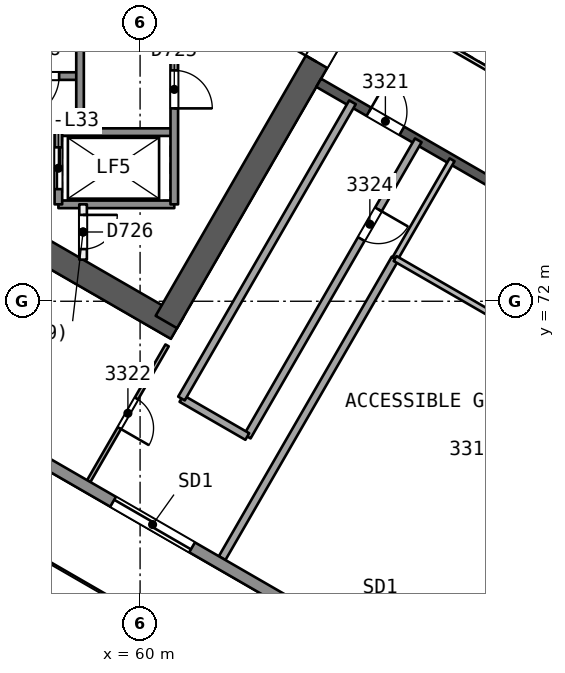
"""IFC4 building model, lengths in metres.
Left out: names, types, materials, properties, quantities, classifications, styles, units other than length and angle.
Written with IfcOpenShell. Run it as: python <this file> out.ifc"""

import sys

from ifc_helpers import new_model, si_unit, direction, frame, frame_2d, origin, place, context, subcontext, project, spatial, rectangle, extrude, element, fill, save


model = new_model("IFC4")
c1 = context("Model", 3, precision=1e-05, world=origin(), true_north=direction((0.0, 1.0)))
c2 = subcontext(c1, "Body", "Model", "MODEL_VIEW")
j1 = project(units=[si_unit("LENGTHUNIT", "METRE"), si_unit("PLANEANGLEUNIT", "RADIAN")], contexts=[c1])
p1 = place(None, origin())
s1 = spatial("IfcSite", under=j1, at=p1, CompositionType="ELEMENT")
p2 = place(p1, origin())
s2 = spatial("IfcBuilding", under=s1, at=p2, CompositionType="ELEMENT")
p3 = place(p2, frame((0.0, 0.0, 136.4)))
s3 = spatial("IfcBuildingStorey", under=s2, at=p3, CompositionType="ELEMENT", Elevation=136.4)
p4 = place(p3, frame((48.722, 78.365, 0.0), z_axis=(0.0, 0.0, 1.0), x_axis=(0.866020036431, -0.500009296414, 0.0)))
e1 = element("IfcWall", 1, at=p4, inside=s3, PredefinedType="SHEAR", context=c2, shape_type="SweptSolid", body=[
    extrude(rectangle(XDim=14.146, YDim=0.65, at=frame_2d((7.073, 0.0))), origin(), (0.0, 0.0, 1.0), 3.7),
])
p5 = place(p3, frame((60.691, 71.455, 0.0), z_axis=(0.0, 0.0, 1.0), x_axis=(0.499983075189, 0.866035175108, 0.0)))
e2 = element("IfcWall", 2, at=p5, inside=s3, PredefinedType="SHEAR", context=c2, shape_type="SweptSolid", body=[
    extrude(rectangle(XDim=10.055, YDim=0.65, at=frame_2d((5.027, 0.0))), origin(), (0.0, 0.0, 1.0), 3.7),
])
p6 = place(p5, frame((7.905, 0.0, 0.0)))
e3 = element("IfcOpeningElement", 3, at=p6, cuts=e2, PredefinedType="OPENING", context=c2, shape_type="SweptSolid", body=[
    extrude(rectangle(XDim=1.2, YDim=2.1, at=frame_2d((0.6, 1.05))), frame((0.0, 0.335, 0.0), z_axis=(0.0, -1.0, 0.0), x_axis=(1.0, 0.0, 0.0)), (0.0, 0.0, 1.0), 0.671),
])
p7 = place(p3, frame((64.7, 77.748, 0.0), z_axis=(0.0, 0.0, 1.0), x_axis=(0.866026492143, -0.499998114903, 0.0)))
e4 = element("IfcWall", 4, at=p7, inside=s3, PredefinedType="SHEAR", context=c2, shape_type="SweptSolid", body=[
    extrude(rectangle(XDim=15.588, YDim=0.25, at=frame_2d((7.794, 0.0))), origin(), (0.0, 0.0, 1.0), 3.25),
])
p8 = place(p7, frame((1.527, 0.0, 0.0)))
e5 = element("IfcOpeningElement", 5, at=p8, cuts=e4, PredefinedType="OPENING", context=c2, shape_type="SweptSolid", body=[
    extrude(rectangle(XDim=1.0, YDim=2.1, at=frame_2d((0.5, 1.05))), frame((0.0, 0.135, 0.0), z_axis=(0.0, -1.0, 0.0), x_axis=(1.0, 0.0, 0.0)), (0.0, 0.0, 1.0), 0.271),
])
p9 = place(p7, frame((8.538, 0.0, 0.0)))
e6 = element("IfcOpeningElement", 6, at=p9, cuts=e4, PredefinedType="OPENING", context=c2, shape_type="SweptSolid", body=[
    extrude(rectangle(XDim=1.1, YDim=2.1, at=frame_2d((0.55, 1.05))), frame((0.0, 0.135, 0.0), z_axis=(0.0, -1.0, 0.0), x_axis=(1.0, 0.0, 0.0)), (0.0, 0.0, 1.0), 0.271),
])
p10 = place(p7, frame((12.906, 0.0, 0.0)))
e7 = element("IfcOpeningElement", 7, at=p10, cuts=e4, PredefinedType="OPENING", context=c2, shape_type="SweptSolid", body=[
    extrude(rectangle(XDim=1.0, YDim=2.1, at=frame_2d((0.5, 1.05))), frame((0.0, 0.135, 0.0), z_axis=(0.0, -1.0, 0.0), x_axis=(1.0, 0.0, 0.0)), (0.0, 0.0, 1.0), 0.271),
])
p11 = place(p3, frame((60.71, 70.838, 0.0), z_axis=(0.0, 0.0, 1.0), x_axis=(-0.499997465321, -0.866026867177, 0.0)))
e8 = element("IfcWall", 8, at=p11, inside=s3, PredefinedType="PARTITIONING", context=c2, shape_type="SweptSolid", body=[
    extrude(rectangle(XDim=4.124, YDim=0.1, at=frame_2d((2.062, 0.0))), origin(), (0.0, 0.0, 1.0), 3.25),
])
p12 = place(p11, frame((1.612, 0.0, 0.0)))
e9 = element("IfcOpeningElement", 9, at=p12, cuts=e8, PredefinedType="OPENING", context=c2, shape_type="SweptSolid", body=[
    extrude(rectangle(XDim=0.9, YDim=2.1, at=frame_2d((0.45, 1.05))), frame((0.0, 0.061, 0.0), z_axis=(0.0, -1.0, 0.0), x_axis=(1.0, 0.0, 0.0)), (0.0, 0.0, 1.0), 0.121),
])
p13 = place(p3, frame((67.321, 76.235, 0.0), z_axis=(0.0, 0.0, 1.0), x_axis=(-0.5000018851, -0.866024315419, 0.0)))
e10 = element("IfcWall", 10, at=p13, inside=s3, PredefinedType="PARTITIONING", context=c2, shape_type="SweptSolid", body=[
    extrude(rectangle(XDim=9.0, YDim=0.2, at=frame_2d((4.5, 0.0))), origin(), (0.0, 0.0, 1.0), 3.25),
])
p14 = place(p13, frame((2.1, 0.0, 0.0)))
e11 = element("IfcOpeningElement", 11, at=p14, cuts=e10, PredefinedType="OPENING", context=c2, shape_type="SweptSolid", body=[
    extrude(rectangle(XDim=0.9, YDim=2.1, at=frame_2d((0.45, 1.05))), frame((0.0, 0.11, 0.0), z_axis=(0.0, -1.0, 0.0), x_axis=(1.0, 0.0, 0.0)), (0.0, 0.0, 1.0), 0.221),
])
p15 = place(p3, frame((62.821, 68.441, 0.0), z_axis=(0.0, 0.0, 1.0), x_axis=(-0.866041268327, 0.499972520799, 0.0)))
e12 = element("IfcWall", 12, at=p15, inside=s3, PredefinedType="PARTITIONING", context=c2, shape_type="SweptSolid", body=[
    extrude(rectangle(XDim=2.0, YDim=0.2, at=frame_2d((1.0, 0.0))), origin(), (0.0, 0.0, 1.0), 3.25),
])
p16 = place(p3, frame((61.089, 69.441, 0.0), z_axis=(0.0, 0.0, 1.0), x_axis=(0.5000018851, 0.866024315419, 0.0)))
e13 = element("IfcWall", 13, at=p16, inside=s3, PredefinedType="PARTITIONING", context=c2, shape_type="SweptSolid", body=[
    extrude(rectangle(XDim=9.0, YDim=0.2, at=frame_2d((4.5, 0.0))), origin(), (0.0, 0.0, 1.0), 3.25),
])
p17 = place(p3, frame((62.158, 65.24, 0.0), z_axis=(0.0, 0.0, 1.0), x_axis=(0.500007237546, 0.866021225145, 0.0)))
e14 = element("IfcWall", 14, at=p17, inside=s3, PredefinedType="PARTITIONING", context=c2, shape_type="SweptSolid", body=[
    extrude(rectangle(XDim=9.103, YDim=0.2, at=frame_2d((4.551, 0.0))), origin(), (0.0, 0.0, 1.0), 3.25),
])
p18 = place(p3, frame((66.71, 73.124, 0.0), z_axis=(0.0, 0.0, 1.0), x_axis=(0.499990139034, 0.866031096941, 0.0)))
e15 = element("IfcWall", 15, at=p18, inside=s3, PredefinedType="PARTITIONING", context=c2, shape_type="SweptSolid", body=[
    extrude(rectangle(XDim=3.0, YDim=0.15, at=frame_2d((1.5, 0.0))), origin(), (0.0, 0.0, 1.0), 3.25),
])
p19 = place(p3, frame((69.221, 71.674, 0.0), z_axis=(0.0, 0.0, 1.0), x_axis=(-0.866032775405, 0.499987231761, 0.0)))
e16 = element("IfcWall", 16, at=p19, inside=s3, PredefinedType="PARTITIONING", context=c2, shape_type="SweptSolid", body=[
    extrude(rectangle(XDim=2.9, YDim=0.15, at=frame_2d((1.45, 0.0))), origin(), (0.0, 0.0, 1.0), 3.25),
])
p20 = place(p3, frame((68.369, 61.655, 0.0), z_axis=(0.0, 0.0, 1.0), x_axis=(0.499987870058, 0.866032406896, 0.0)))
e17 = element("IfcWall", 17, at=p20, inside=s3, PredefinedType="PARTITIONING", context=c2, shape_type="SweptSolid", body=[
    extrude(rectangle(XDim=12.103, YDim=0.2, at=frame_2d((6.051, 0.0))), origin(), (0.0, 0.0, 1.0), 3.25),
])
p21 = place(p3, frame((89.421, 49.328, 0.0), z_axis=(0.0, 0.0, 1.0), x_axis=(-0.866024492862, 0.50000157776, 0.0)))
e18 = element("IfcWall", 18, at=p21, inside=s3, PredefinedType="SOLIDWALL", context=c2, shape_type="SweptSolid", body=[
    extrude(rectangle(XDim=55.649, YDim=0.3, at=frame_2d((27.825, 0.0))), origin(), (0.0, 0.0, 1.0), 3.25),
])
p22 = place(p21, frame((26.781, 0.0, 0.0)))
e19 = element("IfcOpeningElement", 19, at=p22, cuts=e18, PredefinedType="OPENING", context=c2, shape_type="SweptSolid", body=[
    extrude(rectangle(XDim=2.4, YDim=2.4, at=frame_2d((1.2, 1.2))), frame((0.0, 0.161, 0.0), z_axis=(0.0, -1.0, 0.0), x_axis=(1.0, 0.0, 0.0)), (0.0, 0.0, 1.0), 0.321),
])
p23 = place(p21, frame((32.392, 0.0, 0.0)))
e20 = element("IfcOpeningElement", 20, at=p23, cuts=e18, PredefinedType="OPENING", context=c2, shape_type="SweptSolid", body=[
    extrude(rectangle(XDim=2.4, YDim=2.4, at=frame_2d((1.2, 1.2))), frame((0.0, 0.161, 0.0), z_axis=(0.0, -1.0, 0.0), x_axis=(1.0, 0.0, 0.0)), (0.0, 0.0, 1.0), 0.321),
])
p24 = place(p21, frame((43.22, 0.0, 0.0)))
e21 = element("IfcOpeningElement", 21, at=p24, cuts=e18, PredefinedType="OPENING", context=c2, shape_type="SweptSolid", body=[
    extrude(rectangle(XDim=2.4, YDim=2.4, at=frame_2d((1.2, 1.2))), frame((0.0, 0.161, 0.0), z_axis=(0.0, -1.0, 0.0), x_axis=(1.0, 0.0, 0.0)), (0.0, 0.0, 1.0), 0.321),
])
p25 = place(p21, frame((21.013, 0.0, 0.0)))
e22 = element("IfcOpeningElement", 22, at=p25, cuts=e18, PredefinedType="OPENING", context=c2, shape_type="SweptSolid", body=[
    extrude(rectangle(XDim=2.4, YDim=2.4, at=frame_2d((1.2, 1.2))), frame((0.0, 0.161, 0.0), z_axis=(0.0, -1.0, 0.0), x_axis=(1.0, 0.0, 0.0)), (0.0, 0.0, 1.0), 0.321),
])
p26 = place(p21, frame((10.021, 0.0, 0.0)))
e23 = element("IfcOpeningElement", 23, at=p26, cuts=e18, PredefinedType="OPENING", context=c2, shape_type="SweptSolid", body=[
    extrude(rectangle(XDim=2.4, YDim=2.4, at=frame_2d((1.2, 1.2))), frame((0.0, 0.161, 0.0), z_axis=(0.0, -1.0, 0.0), x_axis=(1.0, 0.0, 0.0)), (0.0, 0.0, 1.0), 0.321),
])
p27 = place(p3, frame((58.42, 77.925, 0.0), z_axis=(0.0, 0.0, 1.0), x_axis=(-1.0, 0.0, 0.0)))
e24 = element("IfcWall", 24, at=p27, inside=s3, PredefinedType="SOLIDWALL", context=c2, shape_type="SweptSolid", body=[
    extrude(rectangle(XDim=7.7, YDim=0.2, at=frame_2d((3.85, 0.0))), origin(), (0.0, 0.0, 1.0), 3.25),
])
p28 = place(p27, frame((0.55, 0.0, 0.0)))
e25 = element("IfcOpeningElement", 25, at=p28, cuts=e24, PredefinedType="OPENING", context=c2, shape_type="SweptSolid", body=[
    extrude(rectangle(XDim=1.1, YDim=2.1, at=frame_2d((0.55, 1.05))), frame((0.0, 0.11, 0.0), z_axis=(0.0, -1.0, 0.0), x_axis=(1.0, 0.0, 0.0)), (0.0, 0.0, 1.0), 0.221),
])
for number, where, z_axis, x_axis in (
    (26, (60.9, 76.45, 0.0), (0.0, 0.0, 1.0), (-1.0, 0.0, 0.0)),
    (27, (60.9, 74.55, 0.0), (0.0, 0.0, 1.0), (-1.0, 0.0, 0.0)),
):
    element("IfcWall", number, at=place(p3, frame(where, z_axis=z_axis, x_axis=x_axis)), inside=s3, PredefinedType="SOLIDWALL", context=c2, shape_type="SweptSolid", body=[
        extrude(rectangle(XDim=3.05, YDim=0.2, at=frame_2d((1.525, 0.0))), origin(), (0.0, 0.0, 1.0), 3.25),
    ])
p29 = place(p3, frame((60.9, 85.45, 0.0), z_axis=(0.0, 0.0, 1.0), x_axis=(0.0, -1.0, 0.0)))
e28 = element("IfcWall", 28, at=p29, inside=s3, PredefinedType="SOLIDWALL", context=c2, shape_type="SweptSolid", body=[
    extrude(rectangle(XDim=10.9, YDim=0.2, at=frame_2d((5.45, 0.0))), origin(), (0.0, 0.0, 1.0), 3.25),
])
p30 = place(p29, frame((2.875, 0.0, 0.0)))
e29 = element("IfcOpeningElement", 29, at=p30, cuts=e28, PredefinedType="OPENING", context=c2, shape_type="SweptSolid", body=[
    extrude(rectangle(XDim=1.0, YDim=2.1, at=frame_2d((0.5, 1.05))), frame((0.0, 0.11, 0.0), z_axis=(0.0, -1.0, 0.0), x_axis=(1.0, 0.0, 0.0)), (0.0, 0.0, 1.0), 0.221),
])
p31 = place(p29, frame((7.375, 0.0, 0.0)))
e30 = element("IfcOpeningElement", 30, at=p31, cuts=e28, PredefinedType="OPENING", context=c2, shape_type="SweptSolid", body=[
    extrude(rectangle(XDim=1.0, YDim=2.1, at=frame_2d((0.5, 1.05))), frame((0.0, 0.11, 0.0), z_axis=(0.0, -1.0, 0.0), x_axis=(1.0, 0.0, 0.0)), (0.0, 0.0, 1.0), 0.221),
])
p32 = place(p3, frame((58.5, 74.55, 0.0), z_axis=(0.0, 0.0, 1.0), x_axis=(0.0, -1.0, 0.0)))
e31 = element("IfcWall", 31, at=p32, inside=s3, PredefinedType="PARTITIONING", context=c2, shape_type="SweptSolid", body=[
    extrude(rectangle(XDim=1.455, YDim=0.2, at=frame_2d((0.728, 0.0))), origin(), (0.0, 0.0, 1.0), 3.25),
])
p33 = place(p32, frame((0.278, 0.0, 0.0)))
e32 = element("IfcOpeningElement", 32, at=p33, cuts=e31, PredefinedType="OPENING", context=c2, shape_type="SweptSolid", body=[
    extrude(rectangle(XDim=0.9, YDim=2.1, at=frame_2d((0.45, 1.05))), frame((0.0, 0.11, 0.0), z_axis=(0.0, -1.0, 0.0), x_axis=(1.0, 0.0, 0.0)), (0.0, 0.0, 1.0), 0.221),
])
p34 = place(p3, frame((58.42, 85.45, 0.0), z_axis=(0.0, 0.0, 1.0), x_axis=(0.0, -1.0, 0.0)))
e33 = element("IfcWall", 33, at=p34, inside=s3, PredefinedType="SOLIDWALL", context=c2, shape_type="SweptSolid", body=[
    extrude(rectangle(XDim=9.0, YDim=0.2, at=frame_2d((4.5, 0.0))), origin(), (0.0, 0.0, 1.0), 3.25),
])
p35 = place(p3, frame((57.85, 76.45, 0.0), z_axis=(0.0, 0.0, 1.0), x_axis=(0.0, -1.0, 0.0)))
e34 = element("IfcWall", 34, at=p35, inside=s3, PredefinedType="SOLIDWALL", context=c2, shape_type="SweptSolid", body=[
    extrude(rectangle(XDim=1.9, YDim=0.2, at=frame_2d((0.95, 0.0))), origin(), (0.0, 0.0, 1.0), 3.25),
])
p36 = place(p35, frame((0.4, 0.0, 0.0)))
e35 = element("IfcOpeningElement", 35, at=p36, cuts=e34, PredefinedType="OPENING", context=c2, shape_type="SweptSolid", body=[
    extrude(rectangle(XDim=1.1, YDim=2.1, at=frame_2d((0.55, 1.05))), frame((0.0, 0.11, 0.0), z_axis=(0.0, -1.0, 0.0), x_axis=(1.0, 0.0, 0.0)), (0.0, 0.0, 1.0), 0.221),
])
p37 = place(p3, frame((67.702, 78.948, 0.0), z_axis=(0.0, 0.0, 1.0), x_axis=(0.866026658274, -0.499997827154, 0.0)))
e36 = element("IfcWall", 36, at=p37, inside=s3, PredefinedType="PARTITIONING", context=c2, shape_type="SweptSolid", body=[
    extrude(rectangle(XDim=11.588, YDim=0.1, at=frame_2d((5.794, 0.0))), origin(), (0.0, 0.0, 1.0), 3.25),
])
p38 = place(p8, origin())
e37 = element("IfcDoor", 37, at=p38, inside=s3, OperationType="SINGLE_SWING_LEFT", PredefinedType="NOTDEFINED", context=c2, shape_type="SweptSolid", body=[
    extrude(rectangle(XDim=1.0, YDim=2.1, at=frame_2d((0.5, 1.05))), frame((0.0, 0.025, 0.0), z_axis=(0.0, -1.0, 0.0), x_axis=(1.0, 0.0, 0.0)), (0.0, 0.0, 1.0), 0.05),
])
fill(e5, e37)
p39 = place(p12, origin())
e38 = element("IfcDoor", 38, at=p39, inside=s3, OperationType="SINGLE_SWING_RIGHT", PredefinedType="NOTDEFINED", context=c2, shape_type="SweptSolid", body=[
    extrude(rectangle(XDim=0.9, YDim=2.1, at=frame_2d((0.45, 1.05))), frame((0.0, 0.025, 0.0), z_axis=(0.0, -1.0, 0.0), x_axis=(1.0, 0.0, 0.0)), (0.0, 0.0, 1.0), 0.05),
])
fill(e9, e38)
p40 = place(p14, origin())
e39 = element("IfcDoor", 39, at=p40, inside=s3, OperationType="SINGLE_SWING_LEFT", PredefinedType="NOTDEFINED", context=c2, shape_type="SweptSolid", body=[
    extrude(rectangle(XDim=0.9, YDim=2.1, at=frame_2d((0.45, 1.05))), frame((0.0, 0.025, 0.0), z_axis=(0.0, -1.0, 0.0), x_axis=(1.0, 0.0, 0.0)), (0.0, 0.0, 1.0), 0.05),
])
fill(e11, e39)
p41 = place(p23, origin())
e40 = element("IfcDoor", 40, at=p41, inside=s3, OperationType="SLIDING_TO_RIGHT", PredefinedType="NOTDEFINED", context=c2, shape_type="SweptSolid", body=[
    extrude(rectangle(XDim=2.4, YDim=2.4, at=frame_2d((1.2, 1.2))), frame((0.0, 0.025, 0.0), z_axis=(0.0, -1.0, 0.0), x_axis=(1.0, 0.0, 0.0)), (0.0, 0.0, 1.0), 0.05),
])
fill(e20, e40)
p42 = place(p6, origin())
e41 = element("IfcDoor", 41, at=p42, inside=s3, OperationType="SINGLE_SWING_LEFT", PredefinedType="NOTDEFINED", context=c2, shape_type="SweptSolid", body=[
    extrude(rectangle(XDim=1.2, YDim=2.1, at=frame_2d((0.6, 1.05))), frame((0.0, 0.025, 0.0), z_axis=(0.0, -1.0, 0.0), x_axis=(1.0, 0.0, 0.0)), (0.0, 0.0, 1.0), 0.05),
])
fill(e3, e41)
p43 = place(p36, origin())
e42 = element("IfcDoor", 42, at=p43, inside=s3, OperationType="SLIDING_TO_RIGHT", PredefinedType="NOTDEFINED", context=c2, shape_type="SweptSolid", body=[
    extrude(rectangle(XDim=1.1, YDim=2.1, at=frame_2d((0.55, 1.05))), frame((0.0, 0.025, 0.0), z_axis=(0.0, -1.0, 0.0), x_axis=(1.0, 0.0, 0.0)), (0.0, 0.0, 1.0), 0.05),
])
fill(e35, e42)
p44 = place(p31, origin())
e43 = element("IfcDoor", 43, at=p44, inside=s3, OperationType="SINGLE_SWING_RIGHT", PredefinedType="NOTDEFINED", context=c2, shape_type="SweptSolid", body=[
    extrude(rectangle(XDim=1.0, YDim=2.1, at=frame_2d((0.5, 1.05))), frame((0.0, 0.025, 0.0), z_axis=(0.0, -1.0, 0.0), x_axis=(1.0, 0.0, 0.0)), (0.0, 0.0, 1.0), 0.05),
])
fill(e30, e43)
p45 = place(p33, origin())
e44 = element("IfcDoor", 44, at=p45, inside=s3, OperationType="SINGLE_SWING_LEFT", PredefinedType="NOTDEFINED", context=c2, shape_type="SweptSolid", body=[
    extrude(rectangle(XDim=0.9, YDim=2.1, at=frame_2d((0.45, 1.05))), frame((0.0, 0.025, 0.0), z_axis=(0.0, -1.0, 0.0), x_axis=(1.0, 0.0, 0.0)), (0.0, 0.0, 1.0), 0.05),
])
fill(e32, e44)
p46 = place(p28, origin())
e45 = element("IfcDoor", 45, at=p46, inside=s3, OperationType="SINGLE_SWING_RIGHT", PredefinedType="NOTDEFINED", context=c2, shape_type="SweptSolid", body=[
    extrude(rectangle(XDim=1.1, YDim=2.1, at=frame_2d((0.55, 1.05))), frame((0.0, 0.025, 0.0), z_axis=(0.0, -1.0, 0.0), x_axis=(1.0, 0.0, 0.0)), (0.0, 0.0, 1.0), 0.05),
])
fill(e25, e45)
save(model, sys.argv[1])
